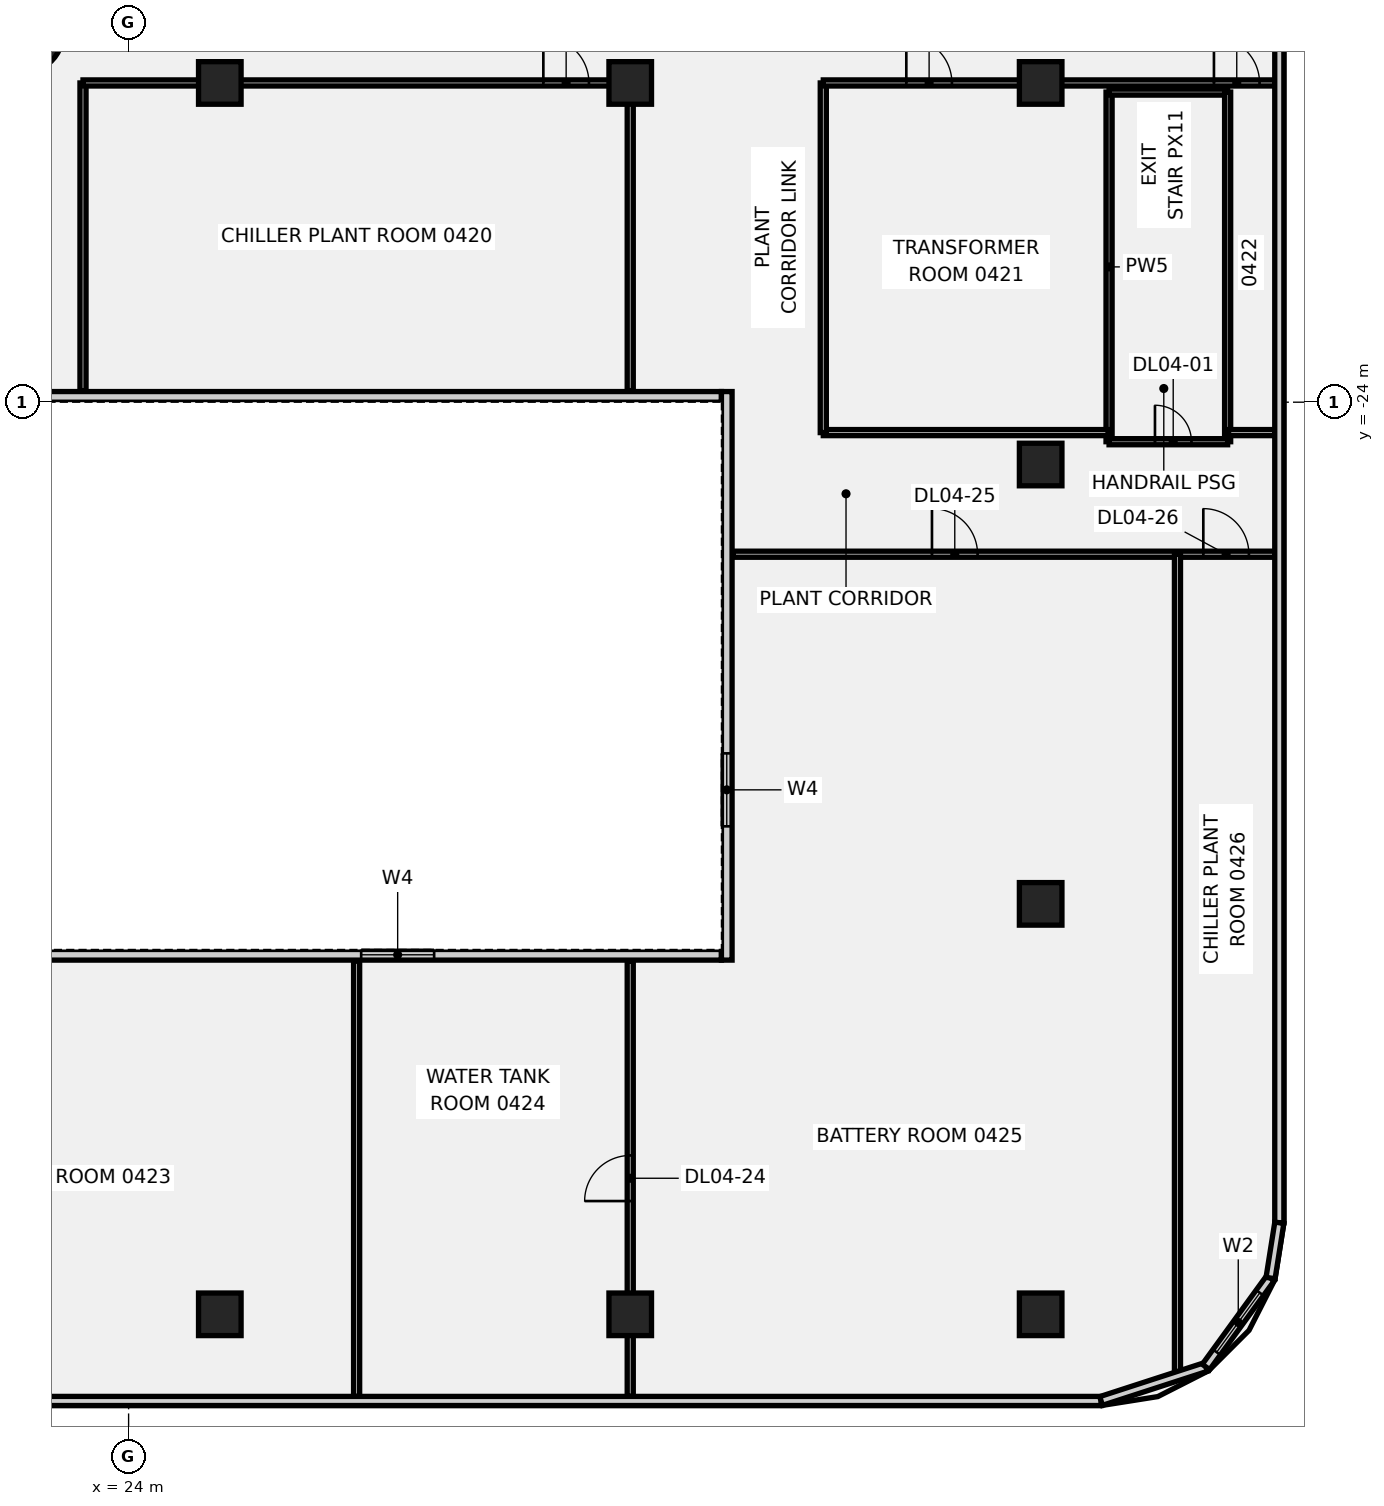
"""IFC4 building model, lengths in metres.
Left out: names, types, materials, properties, quantities, classifications, styles, units other than length and angle.
Written with IfcOpenShell. Run it as: python <this file> out.ifc"""

import sys

from ifc_helpers import new_model, si_unit, direction, frame, frame_2d, origin, origin_2d, place, context, subcontext, project, spatial, rectangle, circle, extrude, element, fill, save


model = new_model("IFC4")
c1 = context("Model", 3, precision=1e-05, world=origin(), true_north=direction((0.0, 1.0)))
c2 = subcontext(c1, "Body", "Model", "MODEL_VIEW")
j1 = project(units=[si_unit("LENGTHUNIT", "METRE"), si_unit("PLANEANGLEUNIT", "RADIAN")], contexts=[c1])
p1 = place(None, origin())
s1 = spatial("IfcSite", under=j1, at=p1, CompositionType="ELEMENT")
p2 = place(p1, origin())
s2 = spatial("IfcBuilding", under=s1, at=p2, CompositionType="ELEMENT")
p3 = place(p2, frame((0.0, 0.0, 25.0)))
s3 = spatial("IfcBuildingStorey", under=s2, at=p3, CompositionType="ELEMENT", Elevation=25.0)
p4 = place(p3, frame((20.543, -11.86, -0.45), z_axis=(0.0, 0.0, 1.0), x_axis=(1.0, 0.0, 0.0)))
e1 = element("IfcColumn", 1, at=p4, inside=s3, PredefinedType="COLUMN", context=c2, shape_type="SweptSolid", body=[
    extrude(circle(Radius=1.3, at=origin_2d()), origin(), (0.0, 0.0, 1.0), 4.35),
])
for number, where, z_axis, x_axis in (
    (2, (27.0, -54.0, -0.45), (0.0, 0.0, 1.0), (1.0, 0.0, 0.0)),
    (3, (27.0, -13.5, -0.45), (0.0, 0.0, 1.0), (1.0, 0.0, 0.0)),
    (4, (40.5, -54.0, -0.45), (0.0, 0.0, 1.0), (1.0, 0.0, 0.0)),
    (5, (40.5, -13.5, -0.45), (0.0, 0.0, 1.0), (1.0, 0.0, 0.0)),
    (6, (54.0, -54.0, -0.45), (0.0, 0.0, 1.0), (1.0, 0.0, 0.0)),
    (7, (54.0, -40.5, -0.45), (0.0, 0.0, 1.0), (1.0, 0.0, 0.0)),
    (8, (54.0, -26.05, -0.45), (0.0, 0.0, 1.0), (1.0, 0.0, 0.0)),
    (9, (54.0, -13.5, -0.45), (0.0, 0.0, 1.0), (1.0, 0.0, 0.0)),
):
    element("IfcColumn", number, at=place(p3, frame(where, z_axis=z_axis, x_axis=x_axis)), inside=s3, PredefinedType="COLUMN", context=c2, shape_type="SweptSolid", body=[
        extrude(rectangle(XDim=1.4, YDim=1.4, at=origin_2d()), origin(), (0.0, 0.0, 1.0), 4.35),
    ])
p5 = place(p3, frame((56.25, -25.3, 0.0), z_axis=(0.0, 0.0, 1.0), x_axis=(0.0, 1.0, 0.0)))
e10 = element("IfcWall", 10, at=p5, inside=s3, PredefinedType="PARTITIONING", context=c2, shape_type="SweptSolid", body=[
    extrude(rectangle(XDim=11.5, YDim=0.2, at=frame_2d((5.75, 0.0))), origin(), (0.0, 0.0, 1.0), 3.9),
])
p6 = place(p3, frame((56.25, -13.8, 0.0), z_axis=(0.0, 0.0, 1.0), x_axis=(1.0, 0.0, 0.0)))
e11 = element("IfcWall", 11, at=p6, inside=s3, PredefinedType="PARTITIONING", context=c2, shape_type="SweptSolid", body=[
    extrude(rectangle(XDim=3.9, YDim=0.2, at=frame_2d((1.95, 0.0))), origin(), (0.0, 0.0, 1.0), 3.9),
])
p7 = place(p3, frame((60.15, -25.3, 0.0), z_axis=(0.0, 0.0, 1.0), x_axis=(0.0, 1.0, 0.0)))
e12 = element("IfcWall", 12, at=p7, inside=s3, PredefinedType="PARTITIONING", context=c2, shape_type="SweptSolid", body=[
    extrude(rectangle(XDim=11.5, YDim=0.2, at=frame_2d((5.75, 0.0))), origin(), (0.0, 0.0, 1.0), 3.9),
])
p8 = place(p3, frame((56.25, -25.3, 0.0), z_axis=(0.0, 0.0, 1.0), x_axis=(1.0, 0.0, 0.0)))
e13 = element("IfcWall", 13, at=p8, inside=s3, PredefinedType="PARTITIONING", context=c2, shape_type="SweptSolid", body=[
    extrude(rectangle(XDim=3.9, YDim=0.2, at=frame_2d((1.95, 0.0))), origin(), (0.0, 0.0, 1.0), 3.9),
])
p9 = place(p8, frame((1.51, 0.0, 0.0)))
e14 = element("IfcOpeningElement", 14, at=p9, cuts=e13, PredefinedType="OPENING", context=c2, shape_type="SweptSolid", body=[
    extrude(rectangle(XDim=1.2, YDim=2.1, at=frame_2d((0.6, 1.05))), frame((0.0, 0.11, 0.0), z_axis=(0.0, -1.0, 0.0), x_axis=(1.0, 0.0, 0.0)), (0.0, 0.0, 1.0), 0.22),
])
p10 = place(p3, frame((22.5, -23.62, 0.0), z_axis=(0.0, 0.0, 1.0), x_axis=(0.0, 1.0, 0.0)))
e15 = element("IfcWall", 15, at=p10, inside=s3, PredefinedType="PARTITIONING", context=c2, shape_type="SweptSolid", body=[
    extrude(rectangle(XDim=10.12, YDim=0.2, at=frame_2d((5.06, 0.0))), origin(), (0.0, 0.0, 1.0), 3.9),
])
p11 = place(p3, frame((22.5, -13.5, 0.0), z_axis=(0.0, 0.0, 1.0), x_axis=(1.0, 0.0, 0.0)))
e16 = element("IfcWall", 16, at=p11, inside=s3, PredefinedType="PARTITIONING", context=c2, shape_type="SweptSolid", body=[
    extrude(rectangle(XDim=18.0, YDim=0.2, at=frame_2d((9.0, 0.0))), origin(), (0.0, 0.0, 1.0), 3.9),
])
p12 = place(p11, frame((15.142, 0.0, 0.0)))
e17 = element("IfcOpeningElement", 17, at=p12, cuts=e16, PredefinedType="OPENING", context=c2, shape_type="SweptSolid", body=[
    extrude(rectangle(XDim=1.5, YDim=2.1, at=frame_2d((0.75, 1.05))), frame((0.0, 0.11, 0.0), z_axis=(0.0, -1.0, 0.0), x_axis=(1.0, 0.0, 0.0)), (0.0, 0.0, 1.0), 0.22),
])
p13 = place(p3, frame((40.5, -23.62, 0.0), z_axis=(0.0, 0.0, 1.0), x_axis=(0.0, 1.0, 0.0)))
e18 = element("IfcWall", 18, at=p13, inside=s3, PredefinedType="PARTITIONING", context=c2, shape_type="SweptSolid", body=[
    extrude(rectangle(XDim=10.12, YDim=0.2, at=frame_2d((5.06, 0.0))), origin(), (0.0, 0.0, 1.0), 3.9),
])
p14 = place(p3, frame((31.5, -56.699, 0.0), z_axis=(0.0, 0.0, 1.0), x_axis=(0.0, 1.0, 0.0)))
e19 = element("IfcWall", 19, at=p14, inside=s3, PredefinedType="PARTITIONING", context=c2, shape_type="SweptSolid", body=[
    extrude(rectangle(XDim=14.319, YDim=0.2, at=frame_2d((7.16, 0.0))), origin(), (0.0, 0.0, 1.0), 3.9),
])
p15 = place(p3, frame((40.5, -56.699, 0.0), z_axis=(0.0, 0.0, 1.0), x_axis=(0.0, 1.0, 0.0)))
e20 = element("IfcWall", 20, at=p15, inside=s3, PredefinedType="PARTITIONING", context=c2, shape_type="SweptSolid", body=[
    extrude(rectangle(XDim=14.319, YDim=0.2, at=frame_2d((7.16, 0.0))), origin(), (0.0, 0.0, 1.0), 3.9),
])
p16 = place(p15, frame((6.424, 0.0, 0.0)))
e21 = element("IfcOpeningElement", 21, at=p16, cuts=e20, PredefinedType="OPENING", context=c2, shape_type="SweptSolid", body=[
    extrude(rectangle(XDim=1.5, YDim=2.1, at=frame_2d((0.75, 1.05))), frame((0.0, 0.11, 0.0), z_axis=(0.0, -1.0, 0.0), x_axis=(1.0, 0.0, 0.0)), (0.0, 0.0, 1.0), 0.22),
])
p17 = place(p3, frame((43.88, -29.0, 0.0), z_axis=(0.0, 0.0, 1.0), x_axis=(1.0, 0.0, 0.0)))
e22 = element("IfcWall", 22, at=p17, inside=s3, PredefinedType="PARTITIONING", context=c2, shape_type="SweptSolid", body=[
    extrude(rectangle(XDim=17.819, YDim=0.2, at=frame_2d((8.91, 0.0))), origin(), (0.0, 0.0, 1.0), 3.9),
])
p18 = place(p17, frame((6.545, 0.0, 0.0)))
e23 = element("IfcOpeningElement", 23, at=p18, cuts=e22, PredefinedType="OPENING", context=c2, shape_type="SweptSolid", body=[
    extrude(rectangle(XDim=1.5, YDim=2.1, at=frame_2d((0.75, 1.05))), frame((0.0, 0.11, 0.0), z_axis=(0.0, -1.0, 0.0), x_axis=(1.0, 0.0, 0.0)), (0.0, 0.0, 1.0), 0.22),
])
p19 = place(p17, frame((15.47, 0.0, 0.0)))
e24 = element("IfcOpeningElement", 24, at=p19, cuts=e22, PredefinedType="OPENING", context=c2, shape_type="SweptSolid", body=[
    extrude(rectangle(XDim=1.5, YDim=2.1, at=frame_2d((0.75, 1.05))), frame((0.0, 0.11, 0.0), z_axis=(0.0, -1.0, 0.0), x_axis=(1.0, 0.0, 0.0)), (0.0, 0.0, 1.0), 0.22),
])
p20 = place(p3, frame((46.85, -25.0, 0.0), z_axis=(0.0, 0.0, 1.0), x_axis=(1.0, 0.0, 0.0)))
e25 = element("IfcWall", 25, at=p20, inside=s3, PredefinedType="PARTITIONING", context=c2, shape_type="SweptSolid", body=[
    extrude(rectangle(XDim=9.37, YDim=0.2, at=frame_2d((4.685, 0.0))), origin(), (0.0, 0.0, 1.0), 3.9),
])
p21 = place(p3, frame((46.85, -25.0, 0.0), z_axis=(0.0, 0.0, 1.0), x_axis=(0.0, 1.0, 0.0)))
e26 = element("IfcWall", 26, at=p21, inside=s3, PredefinedType="PARTITIONING", context=c2, shape_type="SweptSolid", body=[
    extrude(rectangle(XDim=11.5, YDim=0.2, at=frame_2d((5.75, 0.0))), origin(), (0.0, 0.0, 1.0), 3.9),
])
p22 = place(p3, frame((46.85, -13.5, 0.0), z_axis=(0.0, 0.0, 1.0), x_axis=(1.0, 0.0, 0.0)))
e27 = element("IfcWall", 27, at=p22, inside=s3, PredefinedType="PARTITIONING", context=c2, shape_type="SweptSolid", body=[
    extrude(rectangle(XDim=14.849, YDim=0.2, at=frame_2d((7.424, 0.0))), origin(), (0.0, 0.0, 1.0), 3.9),
])
p23 = place(p22, frame((12.85, 0.0, 0.0)))
e28 = element("IfcOpeningElement", 28, at=p23, cuts=e27, PredefinedType="OPENING", context=c2, shape_type="SweptSolid", body=[
    extrude(rectangle(XDim=1.5, YDim=2.1, at=frame_2d((0.75, 1.05))), frame((0.0, 0.11, 0.0), z_axis=(0.0, -1.0, 0.0), x_axis=(1.0, 0.0, 0.0)), (0.0, 0.0, 1.0), 0.22),
])
p24 = place(p22, frame((2.731, 0.0, 0.0)))
e29 = element("IfcOpeningElement", 29, at=p24, cuts=e27, PredefinedType="OPENING", context=c2, shape_type="SweptSolid", body=[
    extrude(rectangle(XDim=1.5, YDim=2.1, at=frame_2d((0.75, 1.05))), frame((0.0, 0.11, 0.0), z_axis=(0.0, -1.0, 0.0), x_axis=(1.0, 0.0, 0.0)), (0.0, 0.0, 1.0), 0.22),
])
p25 = place(p3, frame((58.5, -56.04, 0.0), z_axis=(0.0, 0.0, 1.0), x_axis=(0.0, 1.0, 0.0)))
e30 = element("IfcWall", 30, at=p25, inside=s3, PredefinedType="PARTITIONING", context=c2, shape_type="SweptSolid", body=[
    extrude(rectangle(XDim=27.04, YDim=0.2, at=frame_2d((13.52, 0.0))), origin(), (0.0, 0.0, 1.0), 3.9),
])
p26 = place(p3, frame((60.18, -25.0, 0.0), z_axis=(0.0, 0.0, 1.0), x_axis=(1.0, 0.0, 0.0)))
e31 = element("IfcWall", 31, at=p26, inside=s3, PredefinedType="PARTITIONING", context=c2, shape_type="SweptSolid", body=[
    extrude(rectangle(XDim=1.519, YDim=0.2, at=frame_2d((0.76, 0.0))), origin(), (0.0, 0.0, 1.0), 3.9),
])
p27 = place(p3, frame((61.85, -50.988, 0.0), z_axis=(0.0, 0.0, 1.0), x_axis=(0.0, 1.0, 0.0)))
e32 = element("IfcWall", 32, at=p27, inside=s3, PredefinedType="SOLIDWALL", context=c2, shape_type="SweptSolid", body=[
    extrude(rectangle(XDim=101.977, YDim=0.3, at=frame_2d((50.988, 0.0))), origin(), (0.0, 0.0, 1.0), 3.9),
])
p28 = place(p27, frame((47.988, 0.0, 1.4)))
e33 = element("IfcOpeningElement", 33, at=p28, cuts=e32, PredefinedType="OPENING", context=c2, shape_type="SweptSolid", body=[
    extrude(rectangle(XDim=6.0, YDim=2.2, at=frame_2d((3.0, 1.1))), frame((0.0, 0.16, 0.0), z_axis=(0.0, -1.0, 0.0), x_axis=(1.0, 0.0, 0.0)), (0.0, 0.0, 1.0), 0.32),
])
p29 = place(p3, frame((-55.988, -56.85, 0.0), z_axis=(0.0, 0.0, 1.0), x_axis=(1.0, 0.0, 0.0)))
e34 = element("IfcWall", 34, at=p29, inside=s3, PredefinedType="SOLIDWALL", context=c2, shape_type="SweptSolid", body=[
    extrude(rectangle(XDim=111.977, YDim=0.3, at=frame_2d((55.988, 0.0))), origin(), (0.0, 0.0, 1.0), 3.9),
])
p30 = place(p29, frame((12.488, 0.0, 1.4)))
e35 = element("IfcOpeningElement", 35, at=p30, cuts=e34, PredefinedType="OPENING", context=c2, shape_type="SweptSolid", body=[
    extrude(rectangle(XDim=6.0, YDim=2.2, at=frame_2d((3.0, 1.1))), frame((0.0, 0.16, 0.0), z_axis=(0.0, -1.0, 0.0), x_axis=(1.0, 0.0, 0.0)), (0.0, 0.0, 1.0), 0.32),
])
p31 = place(p3, frame((55.988, -56.85, 0.0), z_axis=(0.0, 0.0, 1.0), x_axis=(0.951204127457, 0.308562324189, 0.0)))
e36 = element("IfcWall", 36, at=p31, inside=s3, PredefinedType="SOLIDWALL", context=c2, shape_type="SweptSolid", body=[
    extrude(rectangle(XDim=3.626, YDim=0.3, at=frame_2d((1.813, 0.0))), origin(), (0.0, 0.0, 1.0), 3.9),
])
p32 = place(p3, frame((59.438, -55.731, 0.0), z_axis=(0.0, 0.0, 1.0), x_axis=(0.587794100557, 0.80901056566, 0.0)))
e37 = element("IfcWall", 37, at=p32, inside=s3, PredefinedType="SOLIDWALL", context=c2, shape_type="SweptSolid", body=[
    extrude(rectangle(XDim=3.615, YDim=0.3, at=frame_2d((1.807, 0.0))), origin(), (0.0, 0.0, 1.0), 3.9),
])
p33 = place(p32, frame((0.6, 0.0, 1.4)))
e38 = element("IfcOpeningElement", 38, at=p33, cuts=e37, PredefinedType="OPENING", context=c2, shape_type="SweptSolid", body=[
    extrude(rectangle(XDim=2.414, YDim=2.2, at=frame_2d((1.207, 1.1))), frame((0.0, 0.16, 0.0), z_axis=(0.0, -1.0, 0.0), x_axis=(1.0, 0.0, 0.0)), (0.0, 0.0, 1.0), 0.32),
])
p34 = place(p3, frame((61.562, -52.807, 0.0), z_axis=(0.0, 0.0, 1.0), x_axis=(0.15643911056, 0.987687604806, 0.0)))
e39 = element("IfcWall", 39, at=p34, inside=s3, PredefinedType="SOLIDWALL", context=c2, shape_type="SweptSolid", body=[
    extrude(rectangle(XDim=1.842, YDim=0.3, at=frame_2d((0.921, 0.0))), origin(), (0.0, 0.0, 1.0), 3.9),
])
p35 = place(p3, frame((16.8, -42.175, 0.0), z_axis=(0.0, 0.0, 1.0), x_axis=(1.0, 0.0, 0.0)))
e40 = element("IfcWall", 40, at=p35, inside=s3, PredefinedType="SOLIDWALL", context=c2, shape_type="SweptSolid", body=[
    extrude(rectangle(XDim=26.7, YDim=0.35, at=frame_2d((13.35, 0.0))), origin(), (0.0, 0.0, 1.0), 3.9),
])
p36 = place(p35, frame((14.85, 0.0, 1.0)))
e41 = element("IfcOpeningElement", 41, at=p36, cuts=e40, PredefinedType="OPENING", context=c2, shape_type="SweptSolid", body=[
    extrude(rectangle(XDim=2.4, YDim=1.8, at=frame_2d((1.2, 0.9))), frame((0.0, 0.185, 0.0), z_axis=(0.0, -1.0, 0.0), x_axis=(1.0, 0.0, 0.0)), (0.0, 0.0, 1.0), 0.37),
])
p37 = place(p3, frame((16.8, -23.825, 0.0), z_axis=(0.0, 0.0, 1.0), x_axis=(1.0, 0.0, 0.0)))
e42 = element("IfcWall", 42, at=p37, inside=s3, PredefinedType="SOLIDWALL", context=c2, shape_type="SweptSolid", body=[
    extrude(rectangle(XDim=26.7, YDim=0.35, at=frame_2d((13.35, 0.0))), origin(), (0.0, 0.0, 1.0), 3.9),
])
p38 = place(p3, frame((43.675, -42.35, 0.0), z_axis=(0.0, 0.0, 1.0), x_axis=(0.0, 1.0, 0.0)))
e43 = element("IfcWall", 43, at=p38, inside=s3, PredefinedType="SOLIDWALL", context=c2, shape_type="SweptSolid", body=[
    extrude(rectangle(XDim=18.7, YDim=0.35, at=frame_2d((9.35, 0.0))), origin(), (0.0, 0.0, 1.0), 3.9),
])
p39 = place(p38, frame((4.4, 0.0, 1.0)))
e44 = element("IfcOpeningElement", 44, at=p39, cuts=e43, PredefinedType="OPENING", context=c2, shape_type="SweptSolid", body=[
    extrude(rectangle(XDim=2.4, YDim=1.8, at=frame_2d((1.2, 0.9))), frame((0.0, 0.185, 0.0), z_axis=(0.0, -1.0, 0.0), x_axis=(1.0, 0.0, 0.0)), (0.0, 0.0, 1.0), 0.37),
])
p40 = place(p9, origin())
e45 = element("IfcDoor", 45, at=p40, inside=s3, OperationType="SINGLE_SWING_LEFT", PredefinedType="DOOR", context=c2, shape_type="SweptSolid", body=[
    extrude(rectangle(XDim=1.2, YDim=2.1, at=frame_2d((0.6, 1.05))), frame((0.0, 0.025, 0.0), z_axis=(0.0, -1.0, 0.0), x_axis=(1.0, 0.0, 0.0)), (0.0, 0.0, 1.0), 0.05),
])
fill(e14, e45)
p41 = place(p12, origin())
e46 = element("IfcDoor", 46, at=p41, inside=s3, OperationType="SINGLE_SWING_LEFT", PredefinedType="DOOR", context=c2, shape_type="SweptSolid", body=[
    extrude(rectangle(XDim=1.5, YDim=2.1, at=frame_2d((0.75, 1.05))), frame((0.0, 0.025, 0.0), z_axis=(0.0, -1.0, 0.0), x_axis=(1.0, 0.0, 0.0)), (0.0, 0.0, 1.0), 0.05),
])
fill(e17, e46)
p42 = place(p23, origin())
e47 = element("IfcDoor", 47, at=p42, inside=s3, OperationType="SINGLE_SWING_RIGHT", PredefinedType="DOOR", context=c2, shape_type="SweptSolid", body=[
    extrude(rectangle(XDim=1.5, YDim=2.1, at=frame_2d((0.75, 1.05))), frame((0.0, 0.025, 0.0), z_axis=(0.0, -1.0, 0.0), x_axis=(1.0, 0.0, 0.0)), (0.0, 0.0, 1.0), 0.05),
])
fill(e28, e47)
p43 = place(p16, origin())
e48 = element("IfcDoor", 48, at=p43, inside=s3, OperationType="SINGLE_SWING_RIGHT", PredefinedType="DOOR", context=c2, shape_type="SweptSolid", body=[
    extrude(rectangle(XDim=1.5, YDim=2.1, at=frame_2d((0.75, 1.05))), frame((0.0, 0.025, 0.0), z_axis=(0.0, -1.0, 0.0), x_axis=(1.0, 0.0, 0.0)), (0.0, 0.0, 1.0), 0.05),
])
fill(e21, e48)
p44 = place(p18, origin())
e49 = element("IfcDoor", 49, at=p44, inside=s3, OperationType="SINGLE_SWING_LEFT", PredefinedType="DOOR", context=c2, shape_type="SweptSolid", body=[
    extrude(rectangle(XDim=1.5, YDim=2.1, at=frame_2d((0.75, 1.05))), frame((0.0, 0.025, 0.0), z_axis=(0.0, -1.0, 0.0), x_axis=(1.0, 0.0, 0.0)), (0.0, 0.0, 1.0), 0.05),
])
fill(e23, e49)
p45 = place(p19, origin())
e50 = element("IfcDoor", 50, at=p45, inside=s3, OperationType="SINGLE_SWING_RIGHT", PredefinedType="DOOR", context=c2, shape_type="SweptSolid", body=[
    extrude(rectangle(XDim=1.5, YDim=2.1, at=frame_2d((0.75, 1.05))), frame((0.0, 0.025, 0.0), z_axis=(0.0, -1.0, 0.0), x_axis=(1.0, 0.0, 0.0)), (0.0, 0.0, 1.0), 0.05),
])
fill(e24, e50)
p46 = place(p24, origin())
e51 = element("IfcDoor", 51, at=p46, inside=s3, OperationType="SINGLE_SWING_LEFT", PredefinedType="DOOR", context=c2, shape_type="SweptSolid", body=[
    extrude(rectangle(XDim=1.5, YDim=2.1, at=frame_2d((0.75, 1.05))), frame((0.0, 0.025, 0.0), z_axis=(0.0, -1.0, 0.0), x_axis=(1.0, 0.0, 0.0)), (0.0, 0.0, 1.0), 0.05),
])
fill(e29, e51)
p47 = place(p33, origin())
e52 = element("IfcWindow", 52, at=p47, inside=s3, PartitioningType="SINGLE_PANEL", PredefinedType="WINDOW", context=c2, shape_type="SweptSolid", body=[
    extrude(rectangle(XDim=2.414, YDim=2.2, at=frame_2d((1.207, 1.1))), frame((0.0, 0.03, 0.0), z_axis=(0.0, -1.0, 0.0), x_axis=(1.0, 0.0, 0.0)), (0.0, 0.0, 1.0), 0.06),
])
fill(e38, e52)
p48 = place(p36, origin())
e53 = element("IfcWindow", 53, at=p48, inside=s3, PartitioningType="SINGLE_PANEL", PredefinedType="WINDOW", context=c2, shape_type="SweptSolid", body=[
    extrude(rectangle(XDim=2.4, YDim=1.8, at=frame_2d((1.2, 0.9))), frame((0.0, 0.03, 0.0), z_axis=(0.0, -1.0, 0.0), x_axis=(1.0, 0.0, 0.0)), (0.0, 0.0, 1.0), 0.06),
])
fill(e41, e53)
p49 = place(p39, origin())
e54 = element("IfcWindow", 54, at=p49, inside=s3, PartitioningType="SINGLE_PANEL", PredefinedType="WINDOW", context=c2, shape_type="SweptSolid", body=[
    extrude(rectangle(XDim=2.4, YDim=1.8, at=frame_2d((1.2, 0.9))), frame((0.0, 0.03, 0.0), z_axis=(0.0, -1.0, 0.0), x_axis=(1.0, 0.0, 0.0)), (0.0, 0.0, 1.0), 0.06),
])
fill(e44, e54)
save(model, sys.argv[1])
